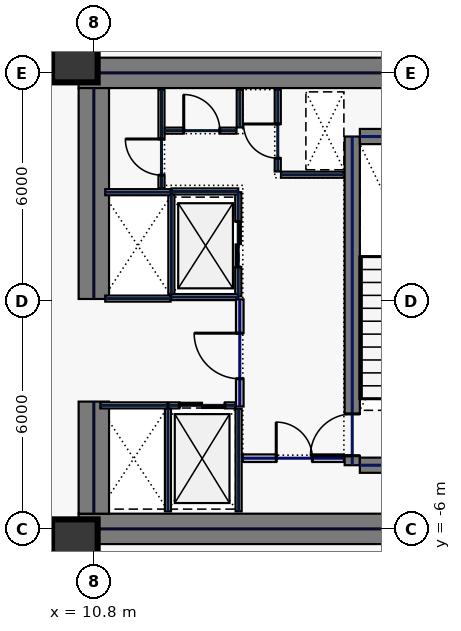
"""IFC4 building model, lengths in metres.
Left out: names, types, materials, properties, quantities, classifications, styles, units other than length and angle.
Written with IfcOpenShell. Run it as: python <this file> out.ifc"""

import sys

from ifc_helpers import new_model, si_unit, direction, frame, frame_2d, origin, origin_2d, place, context, subcontext, project, spatial, rectangle, hollow_rectangle, extrude, element, fill, save


model = new_model("IFC4")
c1 = context("Model", 3, precision=1e-05, world=origin(), true_north=direction((0.0, 1.0)))
c2 = subcontext(c1, "Body", "Model", "MODEL_VIEW")
j1 = project(units=[si_unit("LENGTHUNIT", "METRE"), si_unit("PLANEANGLEUNIT", "RADIAN")], contexts=[c1])
p1 = place(None, origin())
s1 = spatial("IfcSite", under=j1, at=p1, CompositionType="ELEMENT")
p2 = place(p1, origin())
s2 = spatial("IfcBuilding", under=s1, at=p2, CompositionType="ELEMENT")
p3 = place(p2, frame((0.0, 0.0, 71.4)))
s3 = spatial("IfcBuildingStorey", under=s2, at=p3, CompositionType="ELEMENT", Elevation=71.4)
for number, where, z_axis, x_axis in (
    (1, (10.4, 6.0, 0.0), (0.0, 0.0, 1.0), (1.0, 0.0, 0.0)),
    (2, (10.4, -6.0, 0.0), (0.0, 0.0, 1.0), (1.0, 0.0, 0.0)),
):
    element("IfcWall", number, at=place(p3, frame(where, z_axis=z_axis, x_axis=x_axis)), inside=s3, PredefinedType="SHEAR", context=c2, shape_type="SweptSolid", body=[
        extrude(rectangle(XDim=11.6, YDim=0.8, at=frame_2d((5.8, 0.0))), origin(), (0.0, 0.0, 1.0), 3.74),
    ])
p4 = place(p3, frame((10.8, -5.6, 0.0), z_axis=(0.0, 0.0, 1.0), x_axis=(0.0, 1.0, 0.0)))
e3 = element("IfcWall", 3, at=p4, inside=s3, PredefinedType="SHEAR", context=c2, shape_type="SweptSolid", body=[
    extrude(rectangle(XDim=2.95, YDim=0.8, at=frame_2d((1.475, 0.0))), origin(), (0.0, 0.0, 1.0), 3.74),
])
p5 = place(p3, frame((10.8, 0.05, 0.0), z_axis=(0.0, 0.0, 1.0), x_axis=(0.0, 1.0, 0.0)))
e4 = element("IfcWall", 4, at=p5, inside=s3, PredefinedType="SHEAR", context=c2, shape_type="SweptSolid", body=[
    extrude(rectangle(XDim=5.55, YDim=0.8, at=frame_2d((2.775, 0.0))), origin(), (0.0, 0.0, 1.0), 3.74),
])
p6 = place(p3, frame((17.6, -4.325, 0.0), z_axis=(0.0, 0.0, 1.0), x_axis=(0.0, 1.0, 0.0)))
e5 = element("IfcWall", 5, at=p6, inside=s3, PredefinedType="SHEAR", context=c2, shape_type="SweptSolid", body=[
    extrude(rectangle(XDim=8.65, YDim=0.4, at=frame_2d((4.325, 0.0))), origin(), (0.0, 0.0, 1.0), 3.74),
])
p7 = place(p6, frame((0.25, 0.0, 0.0)))
e6 = element("IfcOpeningElement", 6, at=p7, cuts=e5, PredefinedType="OPENING", context=c2, shape_type="SweptSolid", body=[
    extrude(rectangle(XDim=1.1, YDim=2.2, at=frame_2d((0.55, 1.1))), frame((0.0, 0.21, 0.0), z_axis=(0.0, -1.0, 0.0), x_axis=(1.0, 0.0, 0.0)), (0.0, 0.0, 1.0), 0.42),
])
for number, where, z_axis, x_axis in (
    (7, (17.8, -4.325, 0.0), (0.0, 0.0, 1.0), (1.0, 0.0, 0.0)),
    (8, (17.8, 4.325, 0.0), (0.0, 0.0, 1.0), (1.0, 0.0, 0.0)),
):
    element("IfcWall", number, at=place(p3, frame(where, z_axis=z_axis, x_axis=x_axis)), inside=s3, PredefinedType="SHEAR", context=c2, shape_type="SweptSolid", body=[
        extrude(rectangle(XDim=3.4, YDim=0.4, at=frame_2d((1.7, 0.0))), origin(), (0.0, 0.0, 1.0), 3.74),
    ])
for number, where, z_axis, x_axis in (
    (9, (10.3, -6.35, 0.0), (0.0, 0.0, 1.0), (1.0, 0.0, 0.0)),
    (10, (10.3, 6.35, 0.0), (0.0, 0.0, 1.0), (1.0, 0.0, 0.0)),
):
    element("IfcColumn", number, at=place(p3, frame(where, z_axis=z_axis, x_axis=x_axis)), inside=s3, PredefinedType="COLUMN", context=c2, shape_type="SweptSolid", body=[
        extrude(hollow_rectangle(XDim=1.2, YDim=1.2, WallThickness=0.05, at=origin_2d()), origin(), (0.0, 0.0, 1.0), 3.74),
    ])
p8 = place(p3, frame((14.6, 0.12, 0.0), z_axis=(0.0, 0.0, 1.0), x_axis=(0.0, 1.0, 0.0)))
e11 = element("IfcWall", 11, at=p8, inside=s3, PredefinedType="PARTITIONING", context=c2, shape_type="SweptSolid", body=[
    extrude(rectangle(XDim=2.74, YDim=0.16, at=frame_2d((1.37, 0.0))), origin(), (0.0, 0.0, 1.0), 3.74),
])
p9 = place(p8, frame((0.77, 0.0, 0.0)))
e12 = element("IfcOpeningElement", 12, at=p9, cuts=e11, PredefinedType="OPENING", context=c2, shape_type="SweptSolid", body=[
    extrude(rectangle(XDim=1.2, YDim=2.2, at=frame_2d((0.6, 1.1))), frame((0.0, 0.09, 0.0), z_axis=(0.0, -1.0, 0.0), x_axis=(1.0, 0.0, 0.0)), (0.0, 0.0, 1.0), 0.18),
])
for number, where, z_axis, x_axis in (
    (13, (12.84, 0.1, 0.0), (0.0, 0.0, 1.0), (1.0, 0.0, 0.0)),
    (14, (12.84, 2.88, 0.0), (0.0, 0.0, 1.0), (1.0, 0.0, 0.0)),
):
    element("IfcWall", number, at=place(p3, frame(where, z_axis=z_axis, x_axis=x_axis)), inside=s3, PredefinedType="PARTITIONING", context=c2, shape_type="SweptSolid", body=[
        extrude(rectangle(XDim=1.76, YDim=0.16, at=frame_2d((0.88, 0.0))), origin(), (0.0, 0.0, 1.0), 3.74),
    ])
p10 = place(p3, frame((12.84, 0.18, 0.0), z_axis=(0.0, 0.0, 1.0), x_axis=(0.0, 1.0, 0.0)))
e15 = element("IfcWall", 15, at=p10, inside=s3, PredefinedType="PARTITIONING", context=c2, shape_type="SweptSolid", body=[
    extrude(rectangle(XDim=2.62, YDim=0.16, at=frame_2d((1.31, 0.0))), origin(), (0.0, 0.0, 1.0), 3.74),
])
p11 = place(p3, frame((12.77, -2.75, 0.0), z_axis=(0.0, 0.0, 1.0), x_axis=(1.0, 0.0, 0.0)))
e16 = element("IfcWall", 16, at=p11, inside=s3, PredefinedType="PARTITIONING", context=c2, shape_type="SweptSolid", body=[
    extrude(rectangle(XDim=1.76, YDim=0.16, at=frame_2d((0.88, 0.0))), origin(), (0.0, 0.0, 1.0), 3.74),
])
p12 = place(p11, frame((0.28, 0.0, 0.0)))
e17 = element("IfcOpeningElement", 17, at=p12, cuts=e16, PredefinedType="OPENING", context=c2, shape_type="SweptSolid", body=[
    extrude(rectangle(XDim=1.2, YDim=2.2, at=frame_2d((0.6, 1.1))), frame((0.0, 0.09, 0.0), z_axis=(0.0, -1.0, 0.0), x_axis=(1.0, 0.0, 0.0)), (0.0, 0.0, 1.0), 0.18),
])
for number, where, z_axis, x_axis in (
    (18, (12.75, -5.54, 0.0), (0.0, 0.0, 1.0), (0.0, 1.0, 0.0)),
    (19, (14.61, -5.54, 0.0), (0.0, 0.0, 1.0), (0.0, 1.0, 0.0)),
):
    element("IfcWall", number, at=place(p3, frame(where, z_axis=z_axis, x_axis=x_axis)), inside=s3, PredefinedType="PARTITIONING", context=c2, shape_type="SweptSolid", body=[
        extrude(rectangle(XDim=2.7, YDim=0.16, at=frame_2d((1.35, 0.0))), origin(), (0.0, 0.0, 1.0), 3.74),
    ])
p13 = place(p3, frame((10.97, -2.75, 0.0), z_axis=(0.0, 0.0, 1.0), x_axis=(1.0, 0.0, 0.0)))
e20 = element("IfcWall", 20, at=p13, inside=s3, PredefinedType="PARTITIONING", context=c2, shape_type="SweptSolid", body=[
    extrude(rectangle(XDim=1.76, YDim=0.16, at=frame_2d((0.88, 0.0))), origin(), (0.0, 0.0, 1.0), 3.74),
])
for number, where, z_axis, x_axis in (
    (21, (11.1, 0.06, 0.0), (0.0, 0.0, 1.0), (1.0, 0.0, 0.0)),
    (22, (11.1, 2.86, 0.0), (0.0, 0.0, 1.0), (1.0, 0.0, 0.0)),
):
    element("IfcWall", number, at=place(p3, frame(where, z_axis=z_axis, x_axis=x_axis)), inside=s3, PredefinedType="PARTITIONING", context=c2, shape_type="SweptSolid", body=[
        extrude(rectangle(XDim=1.72, YDim=0.16, at=frame_2d((0.86, 0.0))), origin(), (0.0, 0.0, 1.0), 3.74),
    ])
p14 = place(p3, frame((15.64, 3.405, 0.0), z_axis=(0.0, 0.0, 1.0), x_axis=(0.0, 1.0, 0.0)))
e23 = element("IfcWall", 23, at=p14, inside=s3, PredefinedType="PARTITIONING", context=c2, shape_type="SweptSolid", body=[
    extrude(rectangle(XDim=2.155, YDim=0.16, at=frame_2d((1.078, 0.0))), origin(), (0.0, 0.0, 1.0), 3.74),
])
p15 = place(p14, frame((0.35, 0.0, 0.0)))
e24 = element("IfcOpeningElement", 24, at=p15, cuts=e23, PredefinedType="OPENING", context=c2, shape_type="SweptSolid", body=[
    extrude(rectangle(XDim=0.9, YDim=2.2, at=frame_2d((0.45, 1.1))), frame((0.0, 0.09, 0.0), z_axis=(0.0, -1.0, 0.0), x_axis=(1.0, 0.0, 0.0)), (0.0, 0.0, 1.0), 0.18),
])
p16 = place(p3, frame((15.725, 3.32, 0.0), z_axis=(0.0, 0.0, 1.0), x_axis=(1.0, 0.0, 0.0)))
e25 = element("IfcWall", 25, at=p16, inside=s3, PredefinedType="PARTITIONING", context=c2, shape_type="SweptSolid", body=[
    extrude(rectangle(XDim=1.655, YDim=0.16, at=frame_2d((0.827, 0.0))), origin(), (0.0, 0.0, 1.0), 3.74),
])
p17 = place(p3, frame((14.72, -4.14, 0.0), z_axis=(0.0, 0.0, 1.0), x_axis=(1.0, 0.0, 0.0)))
e26 = element("IfcWall", 26, at=p17, inside=s3, PredefinedType="SOLIDWALL", context=c2, shape_type="SweptSolid", body=[
    extrude(rectangle(XDim=2.66, YDim=0.2, at=frame_2d((1.33, 0.0))), origin(), (0.0, 0.0, 1.0), 3.74),
])
p18 = place(p17, frame((0.88, 0.0, 0.0)))
e27 = element("IfcOpeningElement", 27, at=p18, cuts=e26, PredefinedType="OPENING", context=c2, shape_type="SweptSolid", body=[
    extrude(rectangle(XDim=0.95, YDim=2.2, at=frame_2d((0.475, 1.1))), frame((0.0, 0.11, 0.0), z_axis=(0.0, -1.0, 0.0), x_axis=(1.0, 0.0, 0.0)), (0.0, 0.0, 1.0), 0.22),
])
p19 = place(p3, frame((12.58, 2.96, 0.0), z_axis=(0.0, 0.0, 1.0), x_axis=(0.0, 1.0, 0.0)))
e28 = element("IfcWall", 28, at=p19, inside=s3, PredefinedType="PARTITIONING", context=c2, shape_type="SweptSolid", body=[
    extrude(rectangle(XDim=2.6, YDim=0.16, at=frame_2d((1.3, 0.0))), origin(), (0.0, 0.0, 1.0), 3.74),
])
p20 = place(p19, frame((0.35, 0.0, 0.0)))
e29 = element("IfcOpeningElement", 29, at=p20, cuts=e28, PredefinedType="OPENING", context=c2, shape_type="SweptSolid", body=[
    extrude(rectangle(XDim=0.95, YDim=2.2, at=frame_2d((0.475, 1.1))), frame((0.0, 0.09, 0.0), z_axis=(0.0, -1.0, 0.0), x_axis=(1.0, 0.0, 0.0)), (0.0, 0.0, 1.0), 0.18),
])
p21 = place(p3, frame((12.665, 4.48, 0.0), z_axis=(0.0, 0.0, 1.0), x_axis=(1.0, 0.0, 0.0)))
e30 = element("IfcWall", 30, at=p21, inside=s3, PredefinedType="PARTITIONING", context=c2, shape_type="SweptSolid", body=[
    extrude(rectangle(XDim=1.89, YDim=0.16, at=frame_2d((0.945, 0.0))), origin(), (0.0, 0.0, 1.0), 3.74),
])
p22 = place(p21, frame((0.5, 0.0, 0.0)))
e31 = element("IfcOpeningElement", 31, at=p22, cuts=e30, PredefinedType="OPENING", context=c2, shape_type="SweptSolid", body=[
    extrude(rectangle(XDim=0.95, YDim=2.2, at=frame_2d((0.475, 1.1))), frame((0.0, 0.09, 0.0), z_axis=(0.0, -1.0, 0.0), x_axis=(1.0, 0.0, 0.0)), (0.0, 0.0, 1.0), 0.18),
])
p23 = place(p3, frame((14.64, 4.565, 0.0), z_axis=(0.0, 0.0, 1.0), x_axis=(0.0, 1.0, 0.0)))
e32 = element("IfcWall", 32, at=p23, inside=s3, PredefinedType="PARTITIONING", context=c2, shape_type="SweptSolid", body=[
    extrude(rectangle(XDim=0.995, YDim=0.16, at=frame_2d((0.498, 0.0))), origin(), (0.0, 0.0, 1.0), 3.74),
])
p24 = place(p3, frame((14.64, -2.78, 0.0), z_axis=(0.0, 0.0, 1.0), x_axis=(0.0, 1.0, 0.0)))
e33 = element("IfcWall", 33, at=p24, inside=s3, PredefinedType="SOLIDWALL", context=c2, shape_type="SweptSolid", body=[
    extrude(rectangle(XDim=2.82, YDim=0.2, at=frame_2d((1.41, 0.0))), origin(), (0.0, 0.0, 1.0), 3.74),
])
p25 = place(p24, frame((0.73, 0.0, 0.0)))
e34 = element("IfcOpeningElement", 34, at=p25, cuts=e33, PredefinedType="OPENING", context=c2, shape_type="SweptSolid", body=[
    extrude(rectangle(XDim=1.2, YDim=2.2, at=frame_2d((0.6, 1.1))), frame((0.0, 0.11, 0.0), z_axis=(0.0, -1.0, 0.0), x_axis=(1.0, 0.0, 0.0)), (0.0, 0.0, 1.0), 0.22),
])
p26 = place(p3, frame((10.58, 7.435, 0.0), z_axis=(0.0, 0.0, 1.0), x_axis=(0.0, -1.0, 0.0)))
e35 = element("IfcWall", 35, at=p26, inside=s3, PredefinedType="PARTITIONING", context=c2, shape_type="SweptSolid", body=[
    extrude(rectangle(XDim=1.015, YDim=0.16, at=frame_2d((0.508, 0.0))), origin(), (0.0, 0.0, 1.0), 3.74),
])
p27 = place(p3, frame((10.58, -6.42, 0.0), z_axis=(0.0, 0.0, 1.0), x_axis=(0.0, -1.0, 0.0)))
e36 = element("IfcWall", 36, at=p27, inside=s3, PredefinedType="PARTITIONING", context=c2, shape_type="SweptSolid", body=[
    extrude(rectangle(XDim=0.965, YDim=0.16, at=frame_2d((0.482, 0.0))), origin(), (0.0, 0.0, 1.0), 3.74),
])
p28 = place(p7, origin())
e37 = element("IfcDoor", 37, at=p28, inside=s3, OperationType="SINGLE_SWING_LEFT", PredefinedType="DOOR", context=c2, shape_type="SweptSolid", body=[
    extrude(rectangle(XDim=1.1, YDim=2.2, at=frame_2d((0.55, 1.1))), frame((0.0, 0.025, 0.0), z_axis=(0.0, -1.0, 0.0), x_axis=(1.0, 0.0, 0.0)), (0.0, 0.0, 1.0), 0.05),
])
fill(e6, e37)
p29 = place(p9, origin())
e38 = element("IfcDoor", 38, at=p29, inside=s3, OperationType="SLIDING_TO_LEFT", PredefinedType="DOOR", context=c2, shape_type="SweptSolid", body=[
    extrude(rectangle(XDim=1.2, YDim=2.2, at=frame_2d((0.6, 1.1))), frame((0.0, 0.025, 0.0), z_axis=(0.0, -1.0, 0.0), x_axis=(1.0, 0.0, 0.0)), (0.0, 0.0, 1.0), 0.05),
])
fill(e12, e38)
p30 = place(p12, origin())
e39 = element("IfcDoor", 39, at=p30, inside=s3, OperationType="SLIDING_TO_LEFT", PredefinedType="DOOR", context=c2, shape_type="SweptSolid", body=[
    extrude(rectangle(XDim=1.2, YDim=2.2, at=frame_2d((0.6, 1.1))), frame((0.0, 0.025, 0.0), z_axis=(0.0, -1.0, 0.0), x_axis=(1.0, 0.0, 0.0)), (0.0, 0.0, 1.0), 0.05),
])
fill(e17, e39)
p31 = place(p15, origin())
e40 = element("IfcDoor", 40, at=p31, inside=s3, OperationType="SINGLE_SWING_RIGHT", PredefinedType="DOOR", context=c2, shape_type="SweptSolid", body=[
    extrude(rectangle(XDim=0.9, YDim=2.2, at=frame_2d((0.45, 1.1))), frame((0.0, 0.025, 0.0), z_axis=(0.0, -1.0, 0.0), x_axis=(1.0, 0.0, 0.0)), (0.0, 0.0, 1.0), 0.05),
])
fill(e24, e40)
p32 = place(p18, origin())
e41 = element("IfcDoor", 41, at=p32, inside=s3, OperationType="SINGLE_SWING_LEFT", PredefinedType="DOOR", context=c2, shape_type="SweptSolid", body=[
    extrude(rectangle(XDim=0.95, YDim=2.2, at=frame_2d((0.475, 1.1))), frame((0.0, 0.025, 0.0), z_axis=(0.0, -1.0, 0.0), x_axis=(1.0, 0.0, 0.0)), (0.0, 0.0, 1.0), 0.05),
])
fill(e27, e41)
p33 = place(p20, origin())
e42 = element("IfcDoor", 42, at=p33, inside=s3, OperationType="SINGLE_SWING_RIGHT", PredefinedType="DOOR", context=c2, shape_type="SweptSolid", body=[
    extrude(rectangle(XDim=0.95, YDim=2.2, at=frame_2d((0.475, 1.1))), frame((0.0, 0.025, 0.0), z_axis=(0.0, -1.0, 0.0), x_axis=(1.0, 0.0, 0.0)), (0.0, 0.0, 1.0), 0.05),
])
fill(e29, e42)
p34 = place(p22, origin())
e43 = element("IfcDoor", 43, at=p34, inside=s3, OperationType="SINGLE_SWING_LEFT", PredefinedType="DOOR", context=c2, shape_type="SweptSolid", body=[
    extrude(rectangle(XDim=0.95, YDim=2.2, at=frame_2d((0.475, 1.1))), frame((0.0, 0.025, 0.0), z_axis=(0.0, -1.0, 0.0), x_axis=(1.0, 0.0, 0.0)), (0.0, 0.0, 1.0), 0.05),
])
fill(e31, e43)
p35 = place(p25, origin())
e44 = element("IfcDoor", 44, at=p35, inside=s3, OperationType="SINGLE_SWING_RIGHT", PredefinedType="DOOR", context=c2, shape_type="SweptSolid", body=[
    extrude(rectangle(XDim=1.2, YDim=2.2, at=frame_2d((0.6, 1.1))), frame((0.0, 0.025, 0.0), z_axis=(0.0, -1.0, 0.0), x_axis=(1.0, 0.0, 0.0)), (0.0, 0.0, 1.0), 0.05),
])
fill(e34, e44)
save(model, sys.argv[1])
